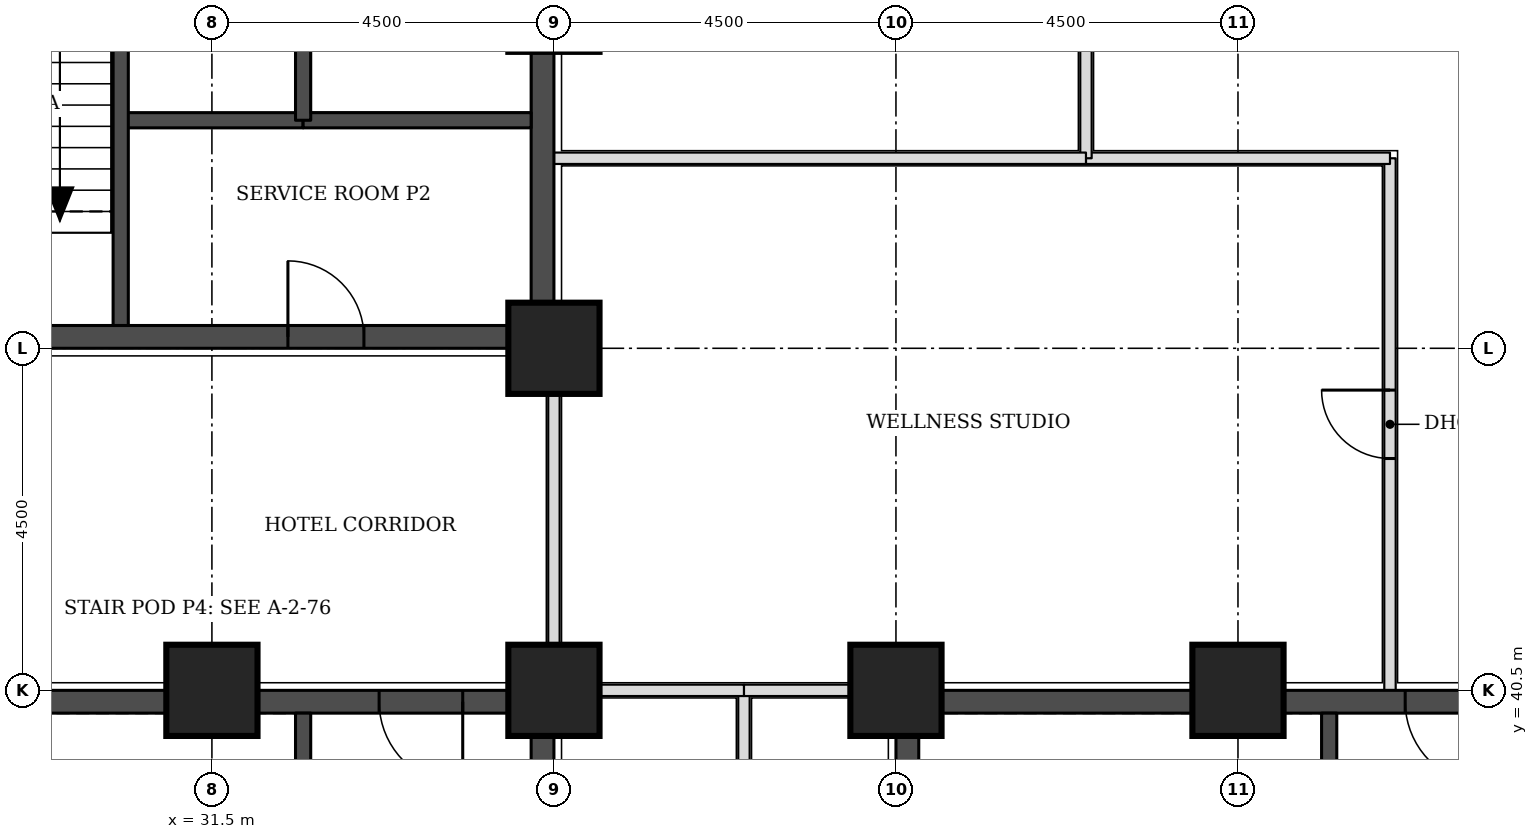
"""IFC4 building model, lengths in metres.
Left out: names, types, materials, properties, quantities, classifications, styles, units other than length and angle.
Written with IfcOpenShell. Run it as: python <this file> out.ifc"""

import sys

from ifc_helpers import new_model, si_unit, direction, frame, frame_2d, origin, origin_2d, place, context, subcontext, project, spatial, rectangle, extrude, element, fill, save


model = new_model("IFC4")
c1 = context("Model", 3, precision=1e-05, world=origin(), true_north=direction((0.0, 1.0)))
c2 = subcontext(c1, "Body", "Model", "MODEL_VIEW")
j1 = project(units=[si_unit("LENGTHUNIT", "METRE"), si_unit("PLANEANGLEUNIT", "RADIAN")], contexts=[c1])
p1 = place(None, origin())
s1 = spatial("IfcSite", under=j1, at=p1, CompositionType="ELEMENT")
p2 = place(p1, origin())
s2 = spatial("IfcBuilding", under=s1, at=p2, CompositionType="ELEMENT")
p3 = place(p2, frame((0.0, 0.0, 36.3)))
s3 = spatial("IfcBuildingStorey", under=s2, at=p3, CompositionType="ELEMENT", Elevation=36.3)
for number, where, z_axis, x_axis in (
    (1, (31.5, 40.5, 0.0), (0.0, 0.0, 1.0), (1.0, 0.0, 0.0)),
    (2, (36.0, 40.5, 0.0), (0.0, 0.0, 1.0), (1.0, 0.0, 0.0)),
    (3, (40.5, 40.5, 0.0), (0.0, 0.0, 1.0), (1.0, 0.0, 0.0)),
    (4, (45.0, 40.5, 0.0), (0.0, 0.0, 1.0), (1.0, 0.0, 0.0)),
    (5, (36.0, 45.0, 0.0), (0.0, 0.0, 1.0), (1.0, 0.0, 0.0)),
):
    element("IfcColumn", number, at=place(p3, frame(where, z_axis=z_axis, x_axis=x_axis)), inside=s3, PredefinedType="COLUMN", context=c2, shape_type="SweptSolid", body=[
        extrude(rectangle(XDim=1.2, YDim=1.2, at=origin_2d()), origin(), (0.0, 0.0, 1.0), 3.3),
    ])
p4 = place(p3, frame((27.3, 45.15, 0.0), z_axis=(0.0, 0.0, 1.0), x_axis=(1.0, 0.0, 0.0)))
e6 = element("IfcWall", 6, at=p4, inside=s3, PredefinedType="SHEAR", context=c2, shape_type="SweptSolid", body=[
    extrude(rectangle(XDim=8.4, YDim=0.3, at=frame_2d((4.2, 0.0))), origin(), (0.0, 0.0, 1.0), 3.3),
])
p5 = place(p4, frame((5.2, 0.0, 0.0)))
e7 = element("IfcOpeningElement", 7, at=p5, cuts=e6, PredefinedType="OPENING", context=c2, shape_type="SweptSolid", body=[
    extrude(rectangle(XDim=1.0, YDim=2.1, at=frame_2d((0.5, 1.05))), frame((0.0, 0.16, 0.0), z_axis=(0.0, -1.0, 0.0), x_axis=(1.0, 0.0, 0.0)), (0.0, 0.0, 1.0), 0.32),
])
p6 = place(p3, frame((35.85, 45.0, 0.0), z_axis=(0.0, 0.0, 1.0), x_axis=(0.0, 1.0, 0.0)))
e8 = element("IfcWall", 8, at=p6, inside=s3, PredefinedType="SHEAR", context=c2, shape_type="SweptSolid", body=[
    extrude(rectangle(XDim=9.0, YDim=0.3, at=frame_2d((4.5, 0.0))), origin(), (0.0, 0.0, 1.0), 3.3),
])
p7 = place(p3, frame((40.8, 40.35, 0.0), z_axis=(0.0, 0.0, 1.0), x_axis=(1.0, 0.0, 0.0)))
e9 = element("IfcWall", 9, at=p7, inside=s3, PredefinedType="SHEAR", context=c2, shape_type="SweptSolid", body=[
    extrude(rectangle(XDim=8.4, YDim=0.3, at=frame_2d((4.2, 0.0))), origin(), (0.0, 0.0, 1.0), 3.3),
])
p8 = place(p7, frame((6.4, 0.0, 0.0)))
e10 = element("IfcOpeningElement", 10, at=p8, cuts=e9, PredefinedType="OPENING", context=c2, shape_type="SweptSolid", body=[
    extrude(rectangle(XDim=1.1, YDim=2.1, at=frame_2d((0.55, 1.05))), frame((0.0, 0.16, 0.0), z_axis=(0.0, -1.0, 0.0), x_axis=(1.0, 0.0, 0.0)), (0.0, 0.0, 1.0), 0.32),
])
p9 = place(p3, frame((40.65, 31.5, 0.0), z_axis=(0.0, 0.0, 1.0), x_axis=(0.0, 1.0, 0.0)))
e11 = element("IfcWall", 11, at=p9, inside=s3, PredefinedType="SHEAR", context=c2, shape_type="SweptSolid", body=[
    extrude(rectangle(XDim=9.0, YDim=0.3, at=frame_2d((4.5, 0.0))), origin(), (0.0, 0.0, 1.0), 3.3),
])
p10 = place(p9, frame((0.4, 0.0, 0.0)))
e12 = element("IfcOpeningElement", 12, at=p10, cuts=e11, PredefinedType="OPENING", context=c2, shape_type="SweptSolid", body=[
    extrude(rectangle(XDim=1.1, YDim=2.1, at=frame_2d((0.55, 1.05))), frame((0.0, 0.16, 0.0), z_axis=(0.0, -1.0, 0.0), x_axis=(1.0, 0.0, 0.0)), (0.0, 0.0, 1.0), 0.32),
])
p11 = place(p3, frame((27.3, 40.35, 0.0), z_axis=(0.0, 0.0, 1.0), x_axis=(1.0, 0.0, 0.0)))
e13 = element("IfcWall", 13, at=p11, inside=s3, PredefinedType="SHEAR", context=c2, shape_type="SweptSolid", body=[
    extrude(rectangle(XDim=8.4, YDim=0.3, at=frame_2d((4.2, 0.0))), origin(), (0.0, 0.0, 1.0), 3.3),
])
p12 = place(p11, frame((6.4, 0.0, 0.0)))
e14 = element("IfcOpeningElement", 14, at=p12, cuts=e13, PredefinedType="OPENING", context=c2, shape_type="SweptSolid", body=[
    extrude(rectangle(XDim=1.1, YDim=2.1, at=frame_2d((0.55, 1.05))), frame((0.0, 0.16, 0.0), z_axis=(0.0, -1.0, 0.0), x_axis=(1.0, 0.0, 0.0)), (0.0, 0.0, 1.0), 0.32),
])
p13 = place(p3, frame((35.85, 31.5, 0.0), z_axis=(0.0, 0.0, 1.0), x_axis=(0.0, 1.0, 0.0)))
e15 = element("IfcWall", 15, at=p13, inside=s3, PredefinedType="SHEAR", context=c2, shape_type="SweptSolid", body=[
    extrude(rectangle(XDim=9.0, YDim=0.3, at=frame_2d((4.5, 0.0))), origin(), (0.0, 0.0, 1.0), 3.3),
])
p14 = place(p3, frame((38.5, 27.15, 0.0), z_axis=(0.0, 0.0, 1.0), x_axis=(0.0, 1.0, 0.0)))
e16 = element("IfcWall", 16, at=p14, inside=s3, PredefinedType="PARTITIONING", context=c2, shape_type="SweptSolid", body=[
    extrude(rectangle(XDim=13.35, YDim=0.15, at=frame_2d((6.675, 0.0))), origin(), (0.0, 0.0, 1.0), 3.08),
])
p15 = place(p14, frame((6.225, 0.0, 0.0)))
e17 = element("IfcOpeningElement", 17, at=p15, cuts=e16, PredefinedType="OPENING", context=c2, shape_type="SweptSolid", body=[
    extrude(rectangle(XDim=0.9, YDim=2.1, at=frame_2d((0.45, 1.05))), frame((0.0, 0.085, 0.0), z_axis=(0.0, -1.0, 0.0), x_axis=(1.0, 0.0, 0.0)), (0.0, 0.0, 1.0), 0.17),
])
p16 = place(p3, frame((38.5, 40.5, 0.0), z_axis=(0.0, 0.0, 1.0), x_axis=(1.0, 0.0, 0.0)))
e18 = element("IfcWall", 18, at=p16, inside=s3, PredefinedType="PARTITIONING", context=c2, shape_type="SweptSolid", body=[
    extrude(rectangle(XDim=1.95, YDim=0.15, at=frame_2d((0.975, 0.0))), origin(), (0.0, 0.0, 1.0), 2.33),
])
p17 = place(p3, frame((36.0, 40.55, 0.0), z_axis=(0.0, 0.0, 1.0), x_axis=(0.0, 1.0, 0.0)))
e19 = element("IfcWall", 19, at=p17, inside=s3, PredefinedType="PARTITIONING", context=c2, shape_type="SweptSolid", body=[
    extrude(rectangle(XDim=4.4, YDim=0.15, at=frame_2d((2.2, 0.0))), origin(), (0.0, 0.0, 1.0), 2.33),
])
p18 = place(p3, frame((47.0, 40.5, 0.0), z_axis=(0.0, 0.0, 1.0), x_axis=(0.0, 1.0, 0.0)))
e20 = element("IfcWall", 20, at=p18, inside=s3, PredefinedType="PARTITIONING", context=c2, shape_type="SweptSolid", body=[
    extrude(rectangle(XDim=7.0, YDim=0.15, at=frame_2d((3.5, 0.0))), origin(), (0.0, 0.0, 1.0), 3.08),
])
p19 = place(p18, frame((3.05, 0.0, 0.0)))
e21 = element("IfcOpeningElement", 21, at=p19, cuts=e20, PredefinedType="OPENING", context=c2, shape_type="SweptSolid", body=[
    extrude(rectangle(XDim=0.9, YDim=2.1, at=frame_2d((0.45, 1.05))), frame((0.0, 0.085, 0.0), z_axis=(0.0, -1.0, 0.0), x_axis=(1.0, 0.0, 0.0)), (0.0, 0.0, 1.0), 0.17),
])
p20 = place(p3, frame((43.0, 47.5, 0.0), z_axis=(0.0, 0.0, 1.0), x_axis=(1.0, 0.0, 0.0)))
e22 = element("IfcWall", 22, at=p20, inside=s3, PredefinedType="PARTITIONING", context=c2, shape_type="SweptSolid", body=[
    extrude(rectangle(XDim=4.0, YDim=0.15, at=frame_2d((2.0, 0.0))), origin(), (0.0, 0.0, 1.0), 3.08),
])
p21 = place(p3, frame((43.0, 47.5, 0.0), z_axis=(0.0, 0.0, 1.0), x_axis=(0.0, 1.0, 0.0)))
e23 = element("IfcWall", 23, at=p21, inside=s3, PredefinedType="PARTITIONING", context=c2, shape_type="SweptSolid", body=[
    extrude(rectangle(XDim=7.85, YDim=0.15, at=frame_2d((3.925, 0.0))), origin(), (0.0, 0.0, 1.0), 3.08),
])
p22 = place(p21, frame((3.475, 0.0, 0.0)))
e24 = element("IfcOpeningElement", 24, at=p22, cuts=e23, PredefinedType="OPENING", context=c2, shape_type="SweptSolid", body=[
    extrude(rectangle(XDim=0.9, YDim=2.1, at=frame_2d((0.45, 1.05))), frame((0.0, 0.085, 0.0), z_axis=(0.0, -1.0, 0.0), x_axis=(1.0, 0.0, 0.0)), (0.0, 0.0, 1.0), 0.17),
])
p23 = place(p3, frame((36.05, 40.5, 0.0), z_axis=(0.0, 0.0, 1.0), x_axis=(1.0, 0.0, 0.0)))
e25 = element("IfcWall", 25, at=p23, inside=s3, PredefinedType="PARTITIONING", context=c2, shape_type="SweptSolid", body=[
    extrude(rectangle(XDim=2.45, YDim=0.15, at=frame_2d((1.225, 0.0))), origin(), (0.0, 0.0, 1.0), 2.33),
])
p24 = place(p3, frame((36.0, 47.5, 0.0), z_axis=(0.0, 0.0, 1.0), x_axis=(1.0, 0.0, 0.0)))
e26 = element("IfcWall", 26, at=p24, inside=s3, PredefinedType="PARTITIONING", context=c2, shape_type="SweptSolid", body=[
    extrude(rectangle(XDim=7.0, YDim=0.15, at=frame_2d((3.5, 0.0))), origin(), (0.0, 0.0, 1.0), 3.08),
])
p25 = place(p3, frame((30.3, 48.0, 0.0), z_axis=(0.0, 0.0, 1.0), x_axis=(1.0, 0.0, 0.0)))
e27 = element("IfcWall", 27, at=p25, inside=s3, PredefinedType="SOLIDWALL", context=c2, shape_type="SweptSolid", body=[
    extrude(rectangle(XDim=2.4, YDim=0.2, at=frame_2d((1.2, 0.0))), origin(), (0.0, 0.0, 1.0), 3.08),
])
p26 = place(p3, frame((32.7, 48.0, 0.0), z_axis=(0.0, 0.0, 1.0), x_axis=(1.0, 0.0, 0.0)))
e28 = element("IfcWall", 28, at=p26, inside=s3, PredefinedType="SOLIDWALL", context=c2, shape_type="SweptSolid", body=[
    extrude(rectangle(XDim=3.0, YDim=0.2, at=frame_2d((1.5, 0.0))), origin(), (0.0, 0.0, 1.0), 3.08),
])
for number, where, z_axis, x_axis in (
    (29, (30.3, 45.3, 0.0), (0.0, 0.0, 1.0), (0.0, 1.0, 0.0)),
    (30, (32.7, 48.0, 0.0), (0.0, 0.0, 1.0), (0.0, 1.0, 0.0)),
    (31, (46.2, 34.5, 0.0), (0.0, 0.0, 1.0), (0.0, 1.0, 0.0)),
    (32, (32.7, 34.5, 0.0), (0.0, 0.0, 1.0), (0.0, 1.0, 0.0)),
):
    element("IfcWall", number, at=place(p3, frame(where, z_axis=z_axis, x_axis=x_axis)), inside=s3, PredefinedType="SOLIDWALL", context=c2, shape_type="SweptSolid", body=[
        extrude(rectangle(XDim=5.7, YDim=0.2, at=frame_2d((2.85, 0.0))), origin(), (0.0, 0.0, 1.0), 3.08),
    ])
p27 = place(p19, origin())
e33 = element("IfcDoor", 33, at=p27, inside=s3, OperationType="SINGLE_SWING_RIGHT", PredefinedType="DOOR", context=c2, shape_type="SweptSolid", body=[
    extrude(rectangle(XDim=0.9, YDim=2.1, at=frame_2d((0.45, 1.05))), frame((0.0, 0.025, 0.0), z_axis=(0.0, -1.0, 0.0), x_axis=(1.0, 0.0, 0.0)), (0.0, 0.0, 1.0), 0.05),
])
fill(e21, e33)
p28 = place(p5, origin())
e34 = element("IfcDoor", 34, at=p28, inside=s3, OperationType="SINGLE_SWING_LEFT", PredefinedType="DOOR", context=c2, shape_type="SweptSolid", body=[
    extrude(rectangle(XDim=1.0, YDim=2.1, at=frame_2d((0.5, 1.05))), frame((0.0, 0.025, 0.0), z_axis=(0.0, -1.0, 0.0), x_axis=(1.0, 0.0, 0.0)), (0.0, 0.0, 1.0), 0.05),
])
fill(e7, e34)
p29 = place(p8, frame((1.1, 0.0, 0.0), z_axis=(0.0, 0.0, 1.0), x_axis=(-1.0, 0.0, 0.0)))
e35 = element("IfcDoor", 35, at=p29, inside=s3, OperationType="SINGLE_SWING_LEFT", PredefinedType="DOOR", context=c2, shape_type="SweptSolid", body=[
    extrude(rectangle(XDim=1.1, YDim=2.1, at=frame_2d((0.55, 1.05))), frame((0.0, 0.025, 0.0), z_axis=(0.0, -1.0, 0.0), x_axis=(1.0, 0.0, 0.0)), (0.0, 0.0, 1.0), 0.05),
])
fill(e10, e35)
p30 = place(p12, frame((1.1, 0.0, 0.0), z_axis=(0.0, 0.0, 1.0), x_axis=(-1.0, 0.0, 0.0)))
e36 = element("IfcDoor", 36, at=p30, inside=s3, OperationType="SINGLE_SWING_LEFT", PredefinedType="DOOR", context=c2, shape_type="SweptSolid", body=[
    extrude(rectangle(XDim=1.1, YDim=2.1, at=frame_2d((0.55, 1.05))), frame((0.0, 0.025, 0.0), z_axis=(0.0, -1.0, 0.0), x_axis=(1.0, 0.0, 0.0)), (0.0, 0.0, 1.0), 0.05),
])
fill(e14, e36)
save(model, sys.argv[1])
